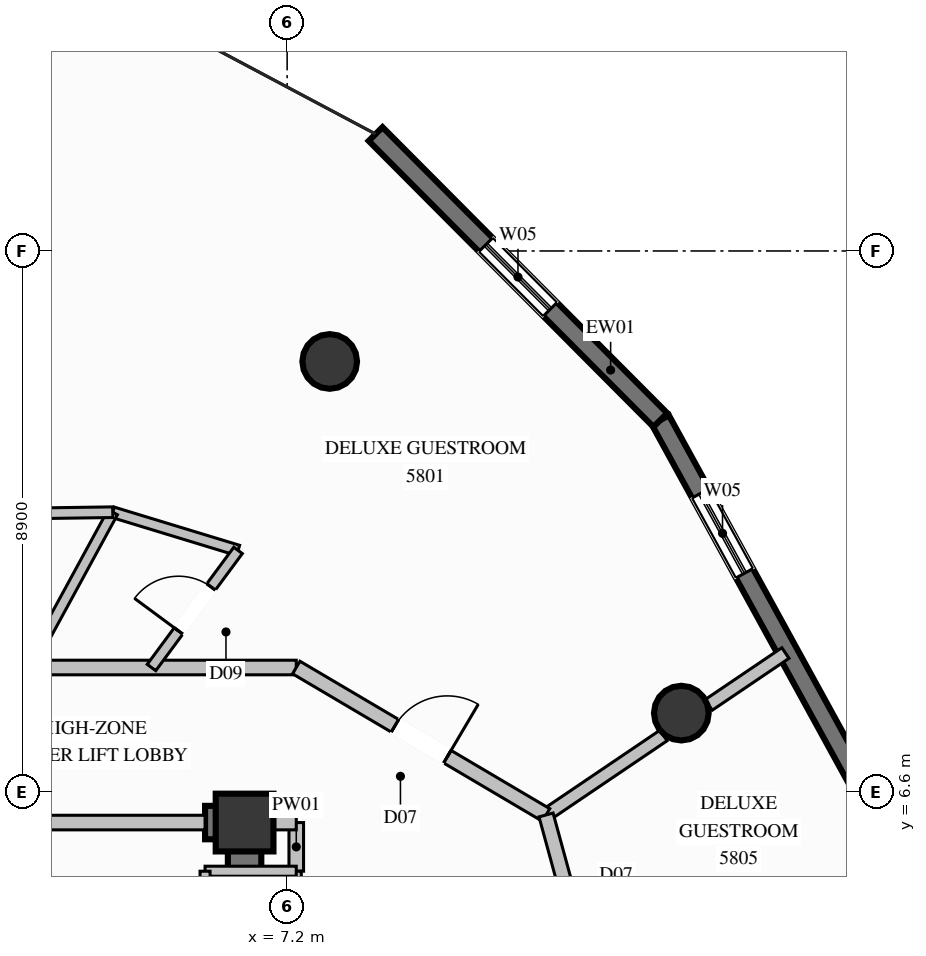
"""IFC4 building model, lengths in metres.
Left out: names, types, materials, properties, quantities, classifications, styles, units other than length and angle.
Written with IfcOpenShell. Run it as: python <this file> out.ifc"""

import sys

from ifc_helpers import new_model, si_unit, direction, frame, frame_2d, origin, origin_2d, place, context, subcontext, project, spatial, rectangle, circle, extrude, element, fill, save


model = new_model("IFC4")
c1 = context("Model", 3, precision=1e-05, world=origin(), true_north=direction((0.0, 1.0)))
c2 = subcontext(c1, "Body", "Model", "MODEL_VIEW")
j1 = project(units=[si_unit("LENGTHUNIT", "METRE"), si_unit("PLANEANGLEUNIT", "RADIAN")], contexts=[c1])
p1 = place(None, origin())
s1 = spatial("IfcSite", under=j1, at=p1, CompositionType="ELEMENT")
p2 = place(p1, origin())
s2 = spatial("IfcBuilding", under=s1, at=p2, CompositionType="ELEMENT")
p3 = place(p2, frame((0.0, 0.0, 216.4)))
s3 = spatial("IfcBuildingStorey", under=s2, at=p3, CompositionType="ELEMENT", Elevation=216.4)
p4 = place(p3, frame((6.5, 6.1, 0.0), z_axis=(0.0, 0.0, 1.0), x_axis=(1.0, 0.0, 0.0)))
e1 = element("IfcColumn", 1, at=p4, inside=s3, PredefinedType="COLUMN", context=c2, shape_type="SweptSolid", body=[
    extrude(rectangle(XDim=0.95, YDim=0.95, at=origin_2d()), origin(), (0.0, 0.0, 1.0), 3.6),
])
p5 = place(p3, frame((5.85, 6.1, 0.0), z_axis=(0.0, 0.0, 1.0), x_axis=(1.0, 0.0, 0.0)))
e2 = element("IfcWall", 2, at=p5, inside=s3, PredefinedType="SHEAR", context=c2, shape_type="SweptSolid", body=[
    extrude(rectangle(XDim=0.375, YDim=0.55, at=frame_2d((0.188, 0.0))), origin(), (0.0, 0.0, 1.0), 3.6),
])
p6 = place(p3, frame((6.5, 3.35, 0.0), z_axis=(0.0, 0.0, 1.0), x_axis=(0.0, 1.0, 0.0)))
e3 = element("IfcWall", 3, at=p6, inside=s3, PredefinedType="SHEAR", context=c2, shape_type="SweptSolid", body=[
    extrude(rectangle(XDim=3.025, YDim=0.55, at=frame_2d((1.512, 0.0))), origin(), (0.0, 0.0, 1.0), 3.6),
])
for number, where, z_axis, x_axis in (
    (4, (13.683, 7.9, 0.0), (0.0, 0.0, 1.0), (1.0, 0.0, 0.0)),
    (5, (7.9, 13.683, 0.0), (0.0, 0.0, 1.0), (1.0, 0.0, 0.0)),
):
    element("IfcColumn", number, at=place(p3, frame(where, z_axis=z_axis, x_axis=x_axis)), inside=s3, PredefinedType="COLUMN", context=c2, shape_type="SweptSolid", body=[
        extrude(circle(Radius=0.45, at=origin_2d()), origin(), (0.0, 0.0, 1.0), 3.6),
    ])
p7 = place(p3, frame((13.338, 12.72, 0.0), z_axis=(0.0, 0.0, 1.0), x_axis=(0.481099413802, -0.876666044762, 0.0)))
e6 = element("IfcWall", 6, at=p7, inside=s3, PredefinedType="SOLIDWALL", context=c2, shape_type="SweptSolid", body=[
    extrude(rectangle(XDim=6.785, YDim=0.32, at=frame_2d((3.393, 0.0))), origin(), (0.0, 0.0, 1.0), 3.36),
])
p8 = place(p7, frame((1.375, 0.0, 0.85)))
e7 = element("IfcOpeningElement", 7, at=p8, cuts=e6, PredefinedType="OPENING", context=c2, shape_type="SweptSolid", body=[
    extrude(rectangle(XDim=1.5, YDim=1.2, at=frame_2d((0.75, 0.6))), frame((0.0, 0.17, 0.0), z_axis=(0.0, -1.0, 0.0), x_axis=(1.0, 0.0, 0.0)), (0.0, 0.0, 1.0), 0.34),
])
p9 = place(p3, frame((8.655, 17.423, 0.0), z_axis=(0.0, 0.0, 1.0), x_axis=(0.705578543979, -0.708631722601, 0.0)))
e8 = element("IfcWall", 8, at=p9, inside=s3, PredefinedType="SOLIDWALL", context=c2, shape_type="SweptSolid", body=[
    extrude(rectangle(XDim=6.637, YDim=0.32, at=frame_2d((3.318, 0.0))), origin(), (0.0, 0.0, 1.0), 3.36),
])
p10 = place(p9, frame((2.568, 0.0, 0.85)))
e9 = element("IfcOpeningElement", 9, at=p10, cuts=e8, PredefinedType="OPENING", context=c2, shape_type="SweptSolid", body=[
    extrude(rectangle(XDim=1.5, YDim=1.2, at=frame_2d((0.75, 0.6))), frame((0.0, 0.17, 0.0), z_axis=(0.0, -1.0, 0.0), x_axis=(1.0, 0.0, 0.0)), (0.0, 0.0, 1.0), 0.34),
])
p11 = place(p3, frame((-7.35, 8.65, 0.0), z_axis=(0.0, 0.0, 1.0), x_axis=(1.0, 0.0, 0.0)))
e10 = element("IfcWall", 10, at=p11, inside=s3, PredefinedType="PARTITIONING", context=c2, shape_type="SweptSolid", body=[
    extrude(rectangle(XDim=14.7, YDim=0.24, at=frame_2d((7.35, 0.0))), origin(), (0.0, 0.0, 1.0), 3.36),
])
p12 = place(p3, frame((3.0, 6.1, 0.0), z_axis=(0.0, 0.0, 1.0), x_axis=(1.0, 0.0, 0.0)))
e11 = element("IfcWall", 11, at=p12, inside=s3, PredefinedType="PARTITIONING", context=c2, shape_type="SweptSolid", body=[
    extrude(rectangle(XDim=2.85, YDim=0.24, at=frame_2d((1.425, 0.0))), origin(), (0.0, 0.0, 1.0), 2.445),
])
p13 = place(p3, frame((7.35, 5.3, 0.0), z_axis=(0.0, 0.0, 1.0), x_axis=(0.0, 1.0, 0.0)))
e12 = element("IfcWall", 12, at=p13, inside=s3, PredefinedType="PARTITIONING", context=c2, shape_type="SweptSolid", body=[
    extrude(rectangle(XDim=0.8, YDim=0.24, at=frame_2d((0.4, 0.0))), origin(), (0.0, 0.0, 1.0), 2.445),
])
p14 = place(p3, frame((6.5, 6.1, 0.0), z_axis=(0.0, 0.0, 1.0), x_axis=(1.0, 0.0, 0.0)))
e13 = element("IfcWall", 13, at=p14, inside=s3, PredefinedType="PARTITIONING", context=c2, shape_type="SweptSolid", body=[
    extrude(rectangle(XDim=0.85, YDim=0.24, at=frame_2d((0.425, 0.0))), origin(), (0.0, 0.0, 1.0), 2.801),
])
p15 = place(p3, frame((7.35, 2.75, 0.0), z_axis=(0.0, 0.0, 1.0), x_axis=(0.0, 1.0, 0.0)))
e14 = element("IfcWall", 14, at=p15, inside=s3, PredefinedType="PARTITIONING", context=c2, shape_type="SweptSolid", body=[
    extrude(rectangle(XDim=2.55, YDim=0.165, at=frame_2d((1.275, 0.0))), origin(), (0.0, 0.0, 1.0), 3.36),
])
p16 = place(p15, frame((0.8, 0.0, 0.0)))
e15 = element("IfcOpeningElement", 15, at=p16, cuts=e14, PredefinedType="OPENING", context=c2, shape_type="SweptSolid", body=[
    extrude(rectangle(XDim=0.95, YDim=2.1, at=frame_2d((0.475, 1.05))), frame((0.0, 0.093, 0.0), z_axis=(0.0, -1.0, 0.0), x_axis=(1.0, 0.0, 0.0)), (0.0, 0.0, 1.0), 0.185),
])
p17 = place(p3, frame((7.35, 5.3, 0.0), z_axis=(0.0, 0.0, 1.0), x_axis=(-1.0, 0.0, 0.0)))
e16 = element("IfcWall", 16, at=p17, inside=s3, PredefinedType="PARTITIONING", context=c2, shape_type="SweptSolid", body=[
    extrude(rectangle(XDim=1.5, YDim=0.165, at=frame_2d((0.75, 0.0))), origin(), (0.0, 0.0, 1.0), 2.445),
])
p18 = place(p3, frame((5.85, 5.3, 0.0), z_axis=(0.0, 0.0, 1.0), x_axis=(0.0, -1.0, 0.0)))
e17 = element("IfcWall", 17, at=p18, inside=s3, PredefinedType="PARTITIONING", context=c2, shape_type="SweptSolid", body=[
    extrude(rectangle(XDim=2.55, YDim=0.165, at=frame_2d((1.275, 0.0))), origin(), (0.0, 0.0, 1.0), 2.445),
])
p19 = place(p3, frame((11.458, 6.225, 0.0), z_axis=(0.0, 0.0, 1.0), x_axis=(0.828279126782, 0.560315703989, 0.0)))
e18 = element("IfcWall", 18, at=p19, inside=s3, PredefinedType="PARTITIONING", context=c2, shape_type="SweptSolid", body=[
    extrude(rectangle(XDim=2.333, YDim=0.21, at=frame_2d((1.166, 0.0))), origin(), (0.0, 0.0, 1.0), 2.801),
])
p20 = place(p3, frame((14.133, 8.035, 0.0), z_axis=(0.0, 0.0, 1.0), x_axis=(0.828482449309, 0.560015027643, 0.0)))
e19 = element("IfcWall", 19, at=p20, inside=s3, PredefinedType="PARTITIONING", context=c2, shape_type="SweptSolid", body=[
    extrude(rectangle(XDim=1.523, YDim=0.21, at=frame_2d((0.762, 0.0))), origin(), (0.0, 0.0, 1.0), 3.36),
])
p21 = place(p3, frame((4.332, 11.204, 0.0), z_axis=(0.0, 0.0, 1.0), x_axis=(0.956557161729, -0.291544844483, 0.0)))
e20 = element("IfcWall", 20, at=p21, inside=s3, PredefinedType="PLUMBINGWALL", context=c2, shape_type="SweptSolid", body=[
    extrude(rectangle(XDim=2.155, YDim=0.175, at=frame_2d((1.077, 0.0))), origin(), (0.0, 0.0, 1.0), 3.36),
])
p22 = place(p3, frame((4.332, 11.204, 0.0), z_axis=(0.0, 0.0, 1.0), x_axis=(-0.47855808815, -0.878055895866, 0.0)))
e21 = element("IfcWall", 21, at=p22, inside=s3, PredefinedType="PLUMBINGWALL", context=c2, shape_type="SweptSolid", body=[
    extrude(rectangle(XDim=2.909, YDim=0.175, at=frame_2d((1.455, 0.0))), origin(), (0.0, 0.0, 1.0), 3.36),
])
p23 = place(p3, frame((4.969, 8.65, 0.0), z_axis=(0.0, 0.0, 1.0), x_axis=(0.594522881491, 0.804078692283, 0.0)))
e22 = element("IfcWall", 22, at=p23, inside=s3, PredefinedType="PLUMBINGWALL", context=c2, shape_type="SweptSolid", body=[
    extrude(rectangle(XDim=2.395, YDim=0.175, at=frame_2d((1.198, 0.0))), origin(), (0.0, 0.0, 1.0), 3.36),
])
p24 = place(p23, frame((0.748, 0.0, 0.0)))
e23 = element("IfcOpeningElement", 23, at=p24, cuts=e22, PredefinedType="OPENING", context=c2, shape_type="SweptSolid", body=[
    extrude(rectangle(XDim=0.9, YDim=2.1, at=frame_2d((0.45, 1.05))), frame((0.0, 0.098, 0.0), z_axis=(0.0, -1.0, 0.0), x_axis=(1.0, 0.0, 0.0)), (0.0, 0.0, 1.0), 0.195),
])
p25 = place(p3, frame((7.35, 8.65, 0.0), z_axis=(0.0, 0.0, 1.0), x_axis=(0.861164858472, -0.508325768118, 0.0)))
e24 = element("IfcWall", 24, at=p25, inside=s3, PredefinedType="PARTITIONING", context=c2, shape_type="SweptSolid", body=[
    extrude(rectangle(XDim=4.77, YDim=0.24, at=frame_2d((2.385, 0.0))), origin(), (0.0, 0.0, 1.0), 3.36),
])
p26 = place(p25, frame((1.885, 0.0, 0.0)))
e25 = element("IfcOpeningElement", 25, at=p26, cuts=e24, PredefinedType="OPENING", context=c2, shape_type="SweptSolid", body=[
    extrude(rectangle(XDim=1.0, YDim=2.2, at=frame_2d((0.5, 1.1))), frame((0.0, 0.13, 0.0), z_axis=(0.0, -1.0, 0.0), x_axis=(1.0, 0.0, 0.0)), (0.0, 0.0, 1.0), 0.26),
])
p27 = place(p3, frame((0.57, 11.15, 0.0), z_axis=(0.0, 0.0, 1.0), x_axis=(0.999896232957, 0.014405669655, 0.0)))
e26 = element("IfcWall", 26, at=p27, inside=s3, PredefinedType="PLUMBINGWALL", context=c2, shape_type="SweptSolid", body=[
    extrude(rectangle(XDim=3.762, YDim=0.175, at=frame_2d((1.881, 0.0))), origin(), (0.0, 0.0, 1.0), 3.36),
])
p28 = place(p3, frame((12.468, 2.527, 0.0), z_axis=(0.0, 0.0, 1.0), x_axis=(-0.263473055226, 0.964666755502, 0.0)))
e27 = element("IfcWall", 27, at=p28, inside=s3, PredefinedType="PARTITIONING", context=c2, shape_type="SweptSolid", body=[
    extrude(rectangle(XDim=3.833, YDim=0.24, at=frame_2d((1.917, 0.0))), origin(), (0.0, 0.0, 1.0), 3.36),
])
p29 = place(p28, frame((1.417, 0.0, 0.0)))
e28 = element("IfcOpeningElement", 28, at=p29, cuts=e27, PredefinedType="OPENING", context=c2, shape_type="SweptSolid", body=[
    extrude(rectangle(XDim=1.0, YDim=2.2, at=frame_2d((0.5, 1.1))), frame((0.0, 0.13, 0.0), z_axis=(0.0, -1.0, 0.0), x_axis=(1.0, 0.0, 0.0)), (0.0, 0.0, 1.0), 0.26),
])
p30 = place(p8, origin())
e29 = element("IfcWindow", 29, at=p30, inside=s3, PartitioningType="SINGLE_PANEL", PredefinedType="WINDOW", context=c2, shape_type="SweptSolid", body=[
    extrude(rectangle(XDim=1.5, YDim=1.2, at=frame_2d((0.75, 0.6))), frame((0.0, 0.03, 0.0), z_axis=(0.0, -1.0, 0.0), x_axis=(1.0, 0.0, 0.0)), (0.0, 0.0, 1.0), 0.06),
])
fill(e7, e29)
p31 = place(p10, origin())
e30 = element("IfcWindow", 30, at=p31, inside=s3, PartitioningType="SINGLE_PANEL", PredefinedType="WINDOW", context=c2, shape_type="SweptSolid", body=[
    extrude(rectangle(XDim=1.5, YDim=1.2, at=frame_2d((0.75, 0.6))), frame((0.0, 0.03, 0.0), z_axis=(0.0, -1.0, 0.0), x_axis=(1.0, 0.0, 0.0)), (0.0, 0.0, 1.0), 0.06),
])
fill(e9, e30)
p32 = place(p24, origin())
e31 = element("IfcDoor", 31, at=p32, inside=s3, OperationType="SINGLE_SWING_LEFT", PredefinedType="DOOR", context=c2, shape_type="SweptSolid", body=[
    extrude(rectangle(XDim=0.9, YDim=2.1, at=frame_2d((0.45, 1.05))), frame((0.0, 0.025, 0.0), z_axis=(0.0, -1.0, 0.0), x_axis=(1.0, 0.0, 0.0)), (0.0, 0.0, 1.0), 0.05),
])
fill(e23, e31)
p33 = place(p26, origin())
e32 = element("IfcDoor", 32, at=p33, inside=s3, OperationType="SINGLE_SWING_RIGHT", PredefinedType="DOOR", context=c2, shape_type="SweptSolid", body=[
    extrude(rectangle(XDim=1.0, YDim=2.2, at=frame_2d((0.5, 1.1))), frame((0.0, 0.025, 0.0), z_axis=(0.0, -1.0, 0.0), x_axis=(1.0, 0.0, 0.0)), (0.0, 0.0, 1.0), 0.05),
])
fill(e25, e32)
save(model, sys.argv[1])
